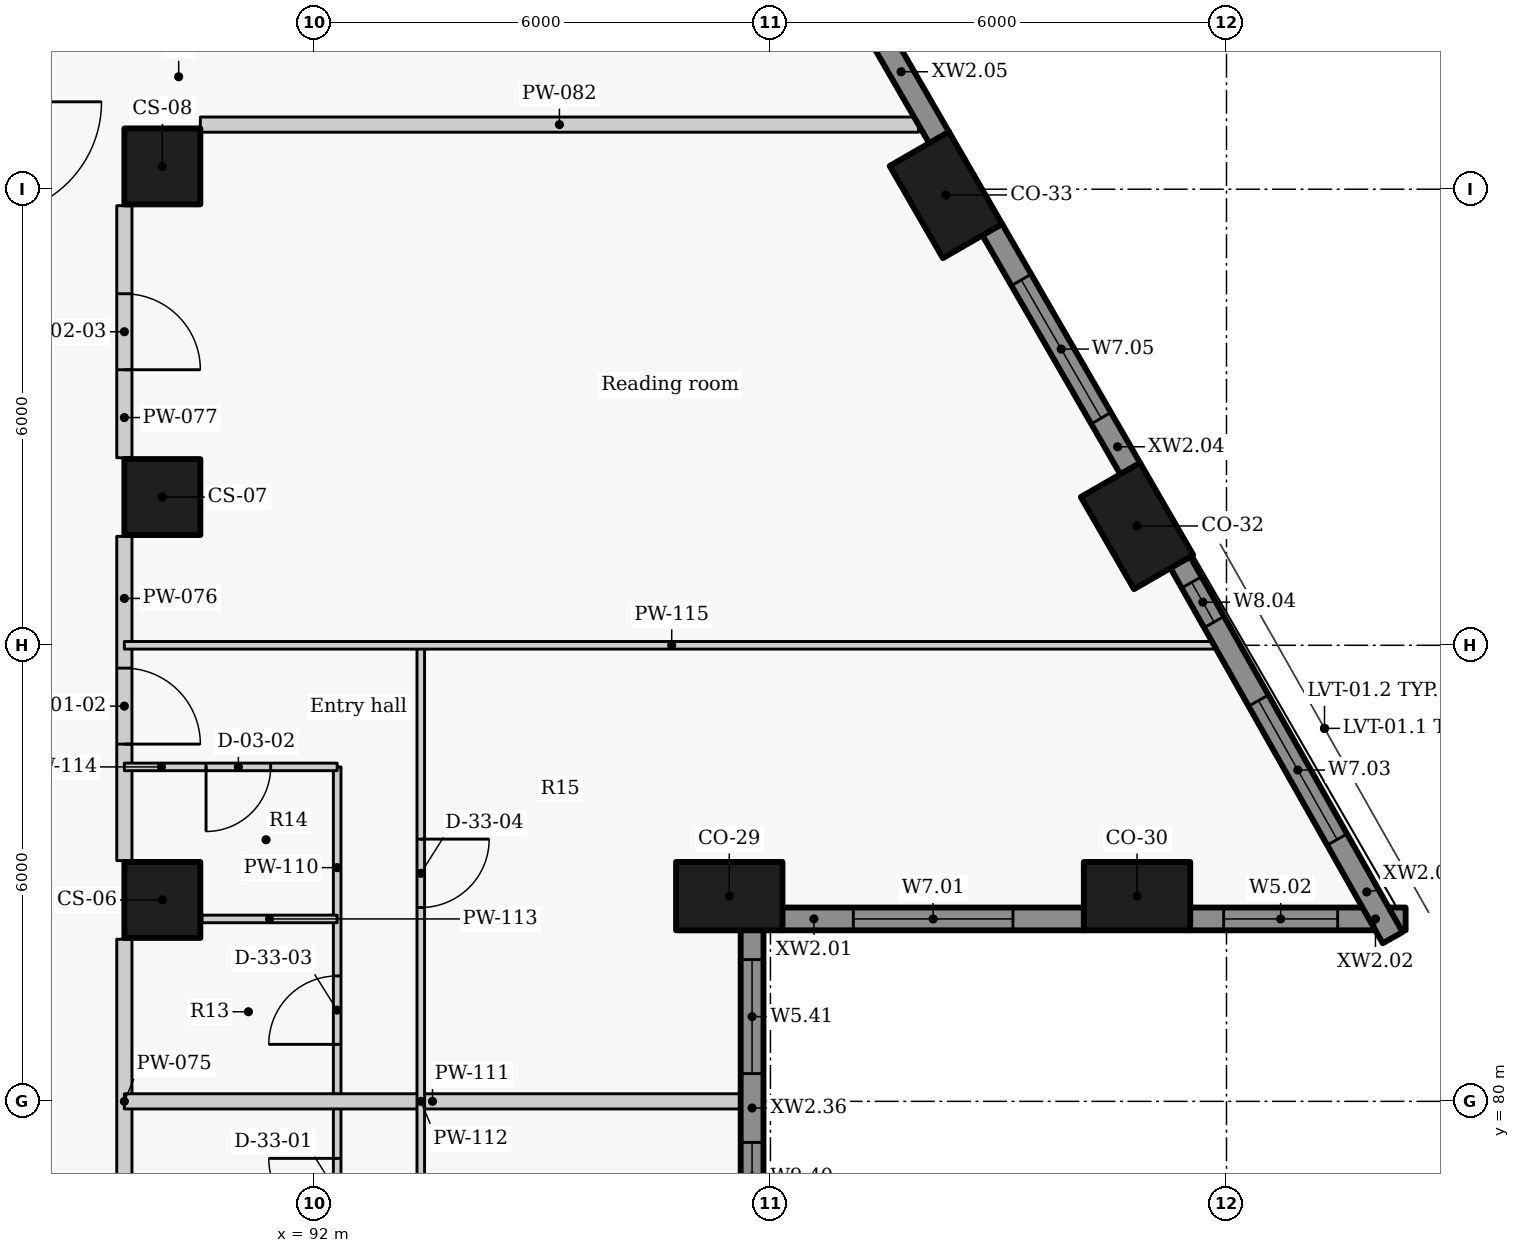
"""IFC4 building model, lengths in metres.
Left out: names, types, materials, properties, quantities, classifications, styles, units other than length and angle.
Written with IfcOpenShell. Run it as: python <this file> out.ifc"""

import sys

from ifc_helpers import new_model, si_unit, direction, frame, frame_2d, origin, origin_2d, place, context, subcontext, project, spatial, rectangle, extrude, element, fill, save


model = new_model("IFC4")
c1 = context("Model", 3, precision=1e-05, world=origin(), true_north=direction((0.0, 1.0)))
c2 = subcontext(c1, "Body", "Model", "MODEL_VIEW")
j1 = project(units=[si_unit("LENGTHUNIT", "METRE"), si_unit("PLANEANGLEUNIT", "RADIAN")], contexts=[c1])
p1 = place(None, origin())
s1 = spatial("IfcSite", under=j1, at=p1, CompositionType="ELEMENT")
p2 = place(p1, origin())
s2 = spatial("IfcBuilding", under=s1, at=p2, CompositionType="ELEMENT")
p3 = place(p2, frame((0.0, 0.0, 87.6)))
s3 = spatial("IfcBuildingStorey", under=s2, at=p3, CompositionType="ELEMENT", Elevation=87.6)
for number, where, z_axis, x_axis in (
    (1, (97.458, 82.7, 0.0), (0.0, 0.0, 1.0), (1.0, 0.0, 0.0)),
    (2, (102.823, 82.7, 0.0), (0.0, 0.0, 1.0), (1.0, 0.0, 0.0)),
    (3, (102.823, 87.57, 0.0), (0.0, 0.0, 1.0), (-0.5, 0.866, 0.0)),
    (4, (100.308, 91.925, 0.0), (0.0, 0.0, 1.0), (-0.5, 0.866, 0.0)),
):
    element("IfcColumn", number, at=place(p3, frame(where, z_axis=z_axis, x_axis=x_axis)), inside=s3, PredefinedType="COLUMN", context=c2, shape_type="SweptSolid", body=[
        extrude(rectangle(XDim=1.4, YDim=0.9, at=origin_2d()), origin(), (0.0, 0.0, 1.0), 3.3),
    ])
for number, where, z_axis, x_axis in (
    (5, (90.0, 82.65, 0.0), (0.0, 0.0, 1.0), (0.0, 1.0, 0.0)),
    (6, (90.0, 87.95, 0.0), (0.0, 0.0, 1.0), (0.0, 1.0, 0.0)),
    (7, (90.0, 92.3, 0.0), (0.0, 0.0, 1.0), (0.0, 1.0, 0.0)),
):
    element("IfcColumn", number, at=place(p3, frame(where, z_axis=z_axis, x_axis=x_axis)), inside=s3, PredefinedType="COLUMN", context=c2, shape_type="SweptSolid", body=[
        extrude(rectangle(XDim=1.0, YDim=1.0, at=origin_2d()), origin(), (0.0, 0.0, 1.0), 3.3),
    ])
p4 = place(p3, frame((98.154, 82.4, 0.0), z_axis=(0.0, 0.0, 1.0), x_axis=(1.0, 0.0, 0.0)))
e8 = element("IfcWall", 8, at=p4, inside=s3, PredefinedType="SOLIDWALL", context=c2, shape_type="SweptSolid", body=[
    extrude(rectangle(XDim=3.973, YDim=0.3, at=frame_2d((1.986, 0.0))), origin(), (0.0, 0.0, 1.0), 2.425),
])
p5 = place(p4, frame((0.936, 0.0, 0.9)))
e9 = element("IfcOpeningElement", 9, at=p5, cuts=e8, PredefinedType="OPENING", context=c2, shape_type="SweptSolid", body=[
    extrude(rectangle(XDim=2.1, YDim=1.1, at=frame_2d((1.05, 0.55))), frame((0.0, 0.16, 0.0), z_axis=(0.0, -1.0, 0.0), x_axis=(1.0, 0.0, 0.0)), (0.0, 0.0, 1.0), 0.32),
])
p6 = place(p3, frame((103.519, 82.4, 0.0), z_axis=(0.0, 0.0, 1.0), x_axis=(1.0, 0.0, 0.0)))
e10 = element("IfcWall", 10, at=p6, inside=s3, PredefinedType="SOLIDWALL", context=c2, shape_type="SweptSolid", body=[
    extrude(rectangle(XDim=2.838, YDim=0.3, at=frame_2d((1.419, 0.0))), origin(), (0.0, 0.0, 1.0), 2.425),
])
p7 = place(p6, frame((0.444, 0.0, 0.9)))
e11 = element("IfcOpeningElement", 11, at=p7, cuts=e10, PredefinedType="OPENING", context=c2, shape_type="SweptSolid", body=[
    extrude(rectangle(XDim=1.5, YDim=1.1, at=frame_2d((0.75, 0.55))), frame((0.0, 0.16, 0.0), z_axis=(0.0, -1.0, 0.0), x_axis=(1.0, 0.0, 0.0)), (0.0, 0.0, 1.0), 0.32),
])
p8 = place(p3, frame((106.186, 82.153, 0.0), z_axis=(0.0, 0.0, 1.0), x_axis=(-0.492456858874, 0.870336855561, 0.0)))
e12 = element("IfcWall", 12, at=p8, inside=s3, PredefinedType="SOLIDWALL", context=c2, shape_type="SweptSolid", body=[
    extrude(rectangle(XDim=5.677, YDim=0.3, at=frame_2d((2.838, 0.0))), origin(), (0.0, 0.0, 1.0), 2.425),
])
p9 = place(p8, frame((1.484, 0.0, 0.9)))
e13 = element("IfcOpeningElement", 13, at=p9, cuts=e12, PredefinedType="OPENING", context=c2, shape_type="SweptSolid", body=[
    extrude(rectangle(XDim=2.1, YDim=1.1, at=frame_2d((1.05, 0.55))), frame((0.0, 0.16, 0.0), z_axis=(0.0, -1.0, 0.0), x_axis=(1.0, 0.0, 0.0)), (0.0, 0.0, 1.0), 0.32),
])
p10 = place(p8, frame((4.771, 0.0, 0.9)))
e14 = element("IfcOpeningElement", 14, at=p10, cuts=e12, PredefinedType="OPENING", context=c2, shape_type="SweptSolid", body=[
    extrude(rectangle(XDim=0.6, YDim=1.1, at=frame_2d((0.3, 0.55))), frame((0.0, 0.16, 0.0), z_axis=(0.0, -1.0, 0.0), x_axis=(1.0, 0.0, 0.0)), (0.0, 0.0, 1.0), 0.32),
])
p11 = place(p3, frame((102.735, 88.323, 0.0), z_axis=(0.0, 0.0, 1.0), x_axis=(-0.500009139881, 0.866020126807, 0.0)))
e15 = element("IfcWall", 15, at=p11, inside=s3, PredefinedType="SOLIDWALL", context=c2, shape_type="SweptSolid", body=[
    extrude(rectangle(XDim=3.637, YDim=0.3, at=frame_2d((1.818, 0.0))), origin(), (0.0, 0.0, 1.0), 2.425),
])
p12 = place(p11, frame((0.768, 0.0, 0.9)))
e16 = element("IfcOpeningElement", 16, at=p12, cuts=e15, PredefinedType="OPENING", context=c2, shape_type="SweptSolid", body=[
    extrude(rectangle(XDim=2.1, YDim=1.1, at=frame_2d((1.05, 0.55))), frame((0.0, 0.16, 0.0), z_axis=(0.0, -1.0, 0.0), x_axis=(1.0, 0.0, 0.0)), (0.0, 0.0, 1.0), 0.32),
])
p13 = place(p3, frame((100.22, 92.677, 0.0), z_axis=(0.0, 0.0, 1.0), x_axis=(-0.499957037901, 0.866050206543, 0.0)))
e17 = element("IfcWall", 17, at=p13, inside=s3, PredefinedType="SOLIDWALL", context=c2, shape_type="SweptSolid", body=[
    extrude(rectangle(XDim=3.934, YDim=0.3, at=frame_2d((1.967, 0.0))), origin(), (0.0, 0.0, 1.0), 2.425),
])
p14 = place(p13, frame((2.104, 0.0, 0.9)))
e18 = element("IfcOpeningElement", 18, at=p14, cuts=e17, PredefinedType="OPENING", context=c2, shape_type="SweptSolid", body=[
    extrude(rectangle(XDim=1.5, YDim=1.1, at=frame_2d((0.75, 0.55))), frame((0.0, 0.16, 0.0), z_axis=(0.0, -1.0, 0.0), x_axis=(1.0, 0.0, 0.0)), (0.0, 0.0, 1.0), 0.32),
])
p15 = place(p3, frame((97.758, 77.996, 0.0), z_axis=(0.0, 0.0, 1.0), x_axis=(0.0, 1.0, 0.0)))
e19 = element("IfcWall", 19, at=p15, inside=s3, PredefinedType="SOLIDWALL", context=c2, shape_type="SweptSolid", body=[
    extrude(rectangle(XDim=4.258, YDim=0.3, at=frame_2d((2.129, 0.0))), origin(), (0.0, 0.0, 1.0), 2.425),
])
p16 = place(p15, frame((0.564, 0.0, 0.9)))
e20 = element("IfcOpeningElement", 20, at=p16, cuts=e19, PredefinedType="OPENING", context=c2, shape_type="SweptSolid", body=[
    extrude(rectangle(XDim=0.9, YDim=1.1, at=frame_2d((0.45, 0.55))), frame((0.0, 0.16, 0.0), z_axis=(0.0, -1.0, 0.0), x_axis=(1.0, 0.0, 0.0)), (0.0, 0.0, 1.0), 0.32),
])
p17 = place(p15, frame((2.369, 0.0, 0.9)))
e21 = element("IfcOpeningElement", 21, at=p17, cuts=e19, PredefinedType="OPENING", context=c2, shape_type="SweptSolid", body=[
    extrude(rectangle(XDim=1.5, YDim=1.1, at=frame_2d((0.75, 0.55))), frame((0.0, 0.16, 0.0), z_axis=(0.0, -1.0, 0.0), x_axis=(1.0, 0.0, 0.0)), (0.0, 0.0, 1.0), 0.32),
])
p18 = place(p3, frame((89.5, 77.867, 0.0), z_axis=(0.0, 0.0, 1.0), x_axis=(0.0, 1.0, 0.0)))
e22 = element("IfcWall", 22, at=p18, inside=s3, PredefinedType="PARTITIONING", context=c2, shape_type="SweptSolid", body=[
    extrude(rectangle(XDim=4.266, YDim=0.2, at=frame_2d((2.133, 0.0))), origin(), (0.0, 0.0, 1.0), 3.025),
])
p19 = place(p3, frame((89.5, 87.433, 0.0), z_axis=(0.0, 0.0, 1.0), x_axis=(0.0, -1.0, 0.0)))
e23 = element("IfcWall", 23, at=p19, inside=s3, PredefinedType="PARTITIONING", context=c2, shape_type="SweptSolid", body=[
    extrude(rectangle(XDim=4.266, YDim=0.2, at=frame_2d((2.133, 0.0))), origin(), (0.0, 0.0, 1.0), 3.025),
])
p20 = place(p19, frame((1.733, 0.0, 0.0)))
e24 = element("IfcOpeningElement", 24, at=p20, cuts=e23, PredefinedType="OPENING", context=c2, shape_type="SweptSolid", body=[
    extrude(rectangle(XDim=1.0, YDim=2.1, at=frame_2d((0.5, 1.05))), frame((0.0, 0.11, 0.0), z_axis=(0.0, -1.0, 0.0), x_axis=(1.0, 0.0, 0.0)), (0.0, 0.0, 1.0), 0.22),
])
p21 = place(p3, frame((89.5, 91.783, 0.0), z_axis=(0.0, 0.0, 1.0), x_axis=(0.0, -1.0, 0.0)))
e25 = element("IfcWall", 25, at=p21, inside=s3, PredefinedType="PARTITIONING", context=c2, shape_type="SweptSolid", body=[
    extrude(rectangle(XDim=3.316, YDim=0.2, at=frame_2d((1.658, 0.0))), origin(), (0.0, 0.0, 1.0), 3.025),
])
p22 = place(p21, frame((1.158, 0.0, 0.0)))
e26 = element("IfcOpeningElement", 26, at=p22, cuts=e25, PredefinedType="OPENING", context=c2, shape_type="SweptSolid", body=[
    extrude(rectangle(XDim=1.0, YDim=2.1, at=frame_2d((0.5, 1.05))), frame((0.0, 0.11, 0.0), z_axis=(0.0, -1.0, 0.0), x_axis=(1.0, 0.0, 0.0)), (0.0, 0.0, 1.0), 0.22),
])
p23 = place(p3, frame((90.5, 92.85, 0.0), z_axis=(0.0, 0.0, 1.0), x_axis=(1.0, 0.0, 0.0)))
e27 = element("IfcWall", 27, at=p23, inside=s3, PredefinedType="PARTITIONING", context=c2, shape_type="SweptSolid", body=[
    extrude(rectangle(XDim=9.448, YDim=0.2, at=frame_2d((4.724, 0.0))), origin(), (0.0, 0.0, 1.0), 2.405),
])
p24 = place(p3, frame((92.3, 75.6, 0.0), z_axis=(0.0, 0.0, 1.0), x_axis=(0.0, 1.0, 0.0)))
e28 = element("IfcWall", 28, at=p24, inside=s3, PredefinedType="PARTITIONING", context=c2, shape_type="SweptSolid", body=[
    extrude(rectangle(XDim=8.8, YDim=0.1, at=frame_2d((4.4, 0.0))), origin(), (0.0, 0.0, 1.0), 3.025),
])
p25 = place(p24, frame((2.75, 0.0, 0.0)))
e29 = element("IfcOpeningElement", 29, at=p25, cuts=e28, PredefinedType="OPENING", context=c2, shape_type="SweptSolid", body=[
    extrude(rectangle(XDim=0.9, YDim=2.1, at=frame_2d((0.45, 1.05))), frame((0.0, 0.06, 0.0), z_axis=(0.0, -1.0, 0.0), x_axis=(1.0, 0.0, 0.0)), (0.0, 0.0, 1.0), 0.12),
])
p26 = place(p24, frame((5.15, 0.0, 0.0)))
e30 = element("IfcOpeningElement", 30, at=p26, cuts=e28, PredefinedType="OPENING", context=c2, shape_type="SweptSolid", body=[
    extrude(rectangle(XDim=0.9, YDim=2.1, at=frame_2d((0.45, 1.05))), frame((0.0, 0.06, 0.0), z_axis=(0.0, -1.0, 0.0), x_axis=(1.0, 0.0, 0.0)), (0.0, 0.0, 1.0), 0.12),
])
p27 = place(p3, frame((89.5, 80.0, 0.0), z_axis=(0.0, 0.0, 1.0), x_axis=(1.0, 0.0, 0.0)))
e31 = element("IfcWall", 31, at=p27, inside=s3, PredefinedType="PARTITIONING", context=c2, shape_type="SweptSolid", body=[
    extrude(rectangle(XDim=8.108, YDim=0.2, at=frame_2d((4.054, 0.0))), origin(), (0.0, 0.0, 1.0), 2.405),
])
p28 = place(p3, frame((93.4, 86.0, 0.0), z_axis=(0.0, 0.0, 1.0), x_axis=(0.0, -1.0, 0.0)))
e32 = element("IfcWall", 32, at=p28, inside=s3, PredefinedType="PARTITIONING", context=c2, shape_type="SweptSolid", body=[
    extrude(rectangle(XDim=12.0, YDim=0.1, at=frame_2d((6.0, 0.0))), origin(), (0.0, 0.0, 1.0), 3.025),
])
p29 = place(p28, frame((8.55, 0.0, 0.0)))
e33 = element("IfcOpeningElement", 33, at=p29, cuts=e32, PredefinedType="OPENING", context=c2, shape_type="SweptSolid", body=[
    extrude(rectangle(XDim=0.9, YDim=2.1, at=frame_2d((0.45, 1.05))), frame((0.0, 0.06, 0.0), z_axis=(0.0, -1.0, 0.0), x_axis=(1.0, 0.0, 0.0)), (0.0, 0.0, 1.0), 0.12),
])
p30 = place(p28, frame((2.55, 0.0, 0.0)))
e34 = element("IfcOpeningElement", 34, at=p30, cuts=e32, PredefinedType="OPENING", context=c2, shape_type="SweptSolid", body=[
    extrude(rectangle(XDim=0.9, YDim=2.1, at=frame_2d((0.45, 1.05))), frame((0.0, 0.06, 0.0), z_axis=(0.0, -1.0, 0.0), x_axis=(1.0, 0.0, 0.0)), (0.0, 0.0, 1.0), 0.12),
])
p31 = place(p3, frame((90.52, 82.4, 0.0), z_axis=(0.0, 0.0, 1.0), x_axis=(1.0, 0.0, 0.0)))
e35 = element("IfcWall", 35, at=p31, inside=s3, PredefinedType="PARTITIONING", context=c2, shape_type="SweptSolid", body=[
    extrude(rectangle(XDim=1.78, YDim=0.1, at=frame_2d((0.89, 0.0))), origin(), (0.0, 0.0, 1.0), 3.025),
])
p32 = place(p3, frame((92.3, 84.4, 0.0), z_axis=(0.0, 0.0, 1.0), x_axis=(-1.0, 0.0, 0.0)))
e36 = element("IfcWall", 36, at=p32, inside=s3, PredefinedType="PARTITIONING", context=c2, shape_type="SweptSolid", body=[
    extrude(rectangle(XDim=2.8, YDim=0.1, at=frame_2d((1.4, 0.0))), origin(), (0.0, 0.0, 1.0), 2.505),
])
p33 = place(p32, frame((0.875, 0.0, 0.0)))
e37 = element("IfcOpeningElement", 37, at=p33, cuts=e36, PredefinedType="OPENING", context=c2, shape_type="SweptSolid", body=[
    extrude(rectangle(XDim=0.85, YDim=2.1, at=frame_2d((0.425, 1.05))), frame((0.0, 0.06, 0.0), z_axis=(0.0, -1.0, 0.0), x_axis=(1.0, 0.0, 0.0)), (0.0, 0.0, 1.0), 0.12),
])
p34 = place(p3, frame((89.5, 86.0, 0.0), z_axis=(0.0, 0.0, 1.0), x_axis=(1.0, 0.0, 0.0)))
e38 = element("IfcWall", 38, at=p34, inside=s3, PredefinedType="PARTITIONING", context=c2, shape_type="SweptSolid", body=[
    extrude(rectangle(XDim=14.402, YDim=0.1, at=frame_2d((7.201, 0.0))), origin(), (0.0, 0.0, 1.0), 2.405),
])
p35 = place(p5, origin())
e39 = element("IfcWindow", 39, at=p35, inside=s3, PartitioningType="SINGLE_PANEL", PredefinedType="WINDOW", context=c2, shape_type="SweptSolid", body=[
    extrude(rectangle(XDim=2.1, YDim=1.1, at=frame_2d((1.05, 0.55))), frame((0.0, 0.03, 0.0), z_axis=(0.0, -1.0, 0.0), x_axis=(1.0, 0.0, 0.0)), (0.0, 0.0, 1.0), 0.06),
])
fill(e9, e39)
p36 = place(p7, origin())
e40 = element("IfcWindow", 40, at=p36, inside=s3, PartitioningType="SINGLE_PANEL", PredefinedType="WINDOW", context=c2, shape_type="SweptSolid", body=[
    extrude(rectangle(XDim=1.5, YDim=1.1, at=frame_2d((0.75, 0.55))), frame((0.0, 0.03, 0.0), z_axis=(0.0, -1.0, 0.0), x_axis=(1.0, 0.0, 0.0)), (0.0, 0.0, 1.0), 0.06),
])
fill(e11, e40)
p37 = place(p9, origin())
e41 = element("IfcWindow", 41, at=p37, inside=s3, PartitioningType="SINGLE_PANEL", PredefinedType="WINDOW", context=c2, shape_type="SweptSolid", body=[
    extrude(rectangle(XDim=2.1, YDim=1.1, at=frame_2d((1.05, 0.55))), frame((0.0, 0.03, 0.0), z_axis=(0.0, -1.0, 0.0), x_axis=(1.0, 0.0, 0.0)), (0.0, 0.0, 1.0), 0.06),
])
fill(e13, e41)
p38 = place(p10, origin())
e42 = element("IfcWindow", 42, at=p38, inside=s3, PartitioningType="SINGLE_PANEL", PredefinedType="WINDOW", context=c2, shape_type="SweptSolid", body=[
    extrude(rectangle(XDim=0.6, YDim=1.1, at=frame_2d((0.3, 0.55))), frame((0.0, 0.03, 0.0), z_axis=(0.0, -1.0, 0.0), x_axis=(1.0, 0.0, 0.0)), (0.0, 0.0, 1.0), 0.06),
])
fill(e14, e42)
p39 = place(p12, origin())
e43 = element("IfcWindow", 43, at=p39, inside=s3, PartitioningType="SINGLE_PANEL", PredefinedType="WINDOW", context=c2, shape_type="SweptSolid", body=[
    extrude(rectangle(XDim=2.1, YDim=1.1, at=frame_2d((1.05, 0.55))), frame((0.0, 0.03, 0.0), z_axis=(0.0, -1.0, 0.0), x_axis=(1.0, 0.0, 0.0)), (0.0, 0.0, 1.0), 0.06),
])
fill(e16, e43)
p40 = place(p16, origin())
e44 = element("IfcWindow", 44, at=p40, inside=s3, PartitioningType="SINGLE_PANEL", PredefinedType="WINDOW", context=c2, shape_type="SweptSolid", body=[
    extrude(rectangle(XDim=0.9, YDim=1.1, at=frame_2d((0.45, 0.55))), frame((0.0, 0.03, 0.0), z_axis=(0.0, -1.0, 0.0), x_axis=(1.0, 0.0, 0.0)), (0.0, 0.0, 1.0), 0.06),
])
fill(e20, e44)
p41 = place(p17, origin())
e45 = element("IfcWindow", 45, at=p41, inside=s3, PartitioningType="SINGLE_PANEL", PredefinedType="WINDOW", context=c2, shape_type="SweptSolid", body=[
    extrude(rectangle(XDim=1.5, YDim=1.1, at=frame_2d((0.75, 0.55))), frame((0.0, 0.03, 0.0), z_axis=(0.0, -1.0, 0.0), x_axis=(1.0, 0.0, 0.0)), (0.0, 0.0, 1.0), 0.06),
])
fill(e21, e45)
p42 = place(p25, origin())
e46 = element("IfcDoor", 46, at=p42, inside=s3, OperationType="SINGLE_SWING_RIGHT", PredefinedType="DOOR", context=c2, shape_type="SweptSolid", body=[
    extrude(rectangle(XDim=0.9, YDim=2.1, at=frame_2d((0.45, 1.05))), frame((0.0, 0.025, 0.0), z_axis=(0.0, -1.0, 0.0), x_axis=(1.0, 0.0, 0.0)), (0.0, 0.0, 1.0), 0.05),
])
fill(e29, e46)
p43 = place(p20, origin())
e47 = element("IfcDoor", 47, at=p43, inside=s3, OperationType="SINGLE_SWING_RIGHT", PredefinedType="DOOR", context=c2, shape_type="SweptSolid", body=[
    extrude(rectangle(XDim=1.0, YDim=2.1, at=frame_2d((0.5, 1.05))), frame((0.0, 0.025, 0.0), z_axis=(0.0, -1.0, 0.0), x_axis=(1.0, 0.0, 0.0)), (0.0, 0.0, 1.0), 0.05),
])
fill(e24, e47)
p44 = place(p26, origin())
e48 = element("IfcDoor", 48, at=p44, inside=s3, OperationType="SINGLE_SWING_LEFT", PredefinedType="DOOR", context=c2, shape_type="SweptSolid", body=[
    extrude(rectangle(XDim=0.9, YDim=2.1, at=frame_2d((0.45, 1.05))), frame((0.0, 0.025, 0.0), z_axis=(0.0, -1.0, 0.0), x_axis=(1.0, 0.0, 0.0)), (0.0, 0.0, 1.0), 0.05),
])
fill(e30, e48)
p45 = place(p33, origin())
e49 = element("IfcDoor", 49, at=p45, inside=s3, OperationType="SINGLE_SWING_RIGHT", PredefinedType="DOOR", context=c2, shape_type="SweptSolid", body=[
    extrude(rectangle(XDim=0.85, YDim=2.1, at=frame_2d((0.425, 1.05))), frame((0.0, 0.025, 0.0), z_axis=(0.0, -1.0, 0.0), x_axis=(1.0, 0.0, 0.0)), (0.0, 0.0, 1.0), 0.05),
])
fill(e37, e49)
p46 = place(p30, origin())
e50 = element("IfcDoor", 50, at=p46, inside=s3, OperationType="SINGLE_SWING_LEFT", PredefinedType="DOOR", context=c2, shape_type="SweptSolid", body=[
    extrude(rectangle(XDim=0.9, YDim=2.1, at=frame_2d((0.45, 1.05))), frame((0.0, 0.025, 0.0), z_axis=(0.0, -1.0, 0.0), x_axis=(1.0, 0.0, 0.0)), (0.0, 0.0, 1.0), 0.05),
])
fill(e34, e50)
p47 = place(p22, origin())
e51 = element("IfcDoor", 51, at=p47, inside=s3, OperationType="SINGLE_SWING_RIGHT", PredefinedType="DOOR", context=c2, shape_type="SweptSolid", body=[
    extrude(rectangle(XDim=1.0, YDim=2.1, at=frame_2d((0.5, 1.05))), frame((0.0, 0.025, 0.0), z_axis=(0.0, -1.0, 0.0), x_axis=(1.0, 0.0, 0.0)), (0.0, 0.0, 1.0), 0.05),
])
fill(e26, e51)
save(model, sys.argv[1])
